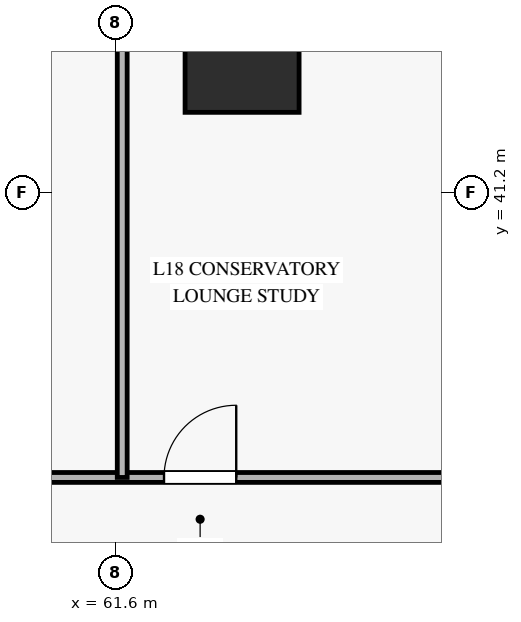
"""IFC4 building model, lengths in metres.
Left out: names, types, materials, properties, quantities, classifications, styles, units other than length and angle.
Written with IfcOpenShell. Run it as: python <this file> out.ifc"""

import sys

from ifc_helpers import new_model, si_unit, direction, frame, frame_2d, origin, origin_2d, place, context, subcontext, project, spatial, rectangle, hollow_rectangle, extrude, source, transform, mapped, element, fill, save


model = new_model("IFC4")
c1 = context("Model", 3, precision=1e-05, world=origin(), true_north=direction((0.0, 1.0)))
c2 = subcontext(c1, "Body", "Model", "MODEL_VIEW")
j1 = project(units=[si_unit("LENGTHUNIT", "METRE"), si_unit("PLANEANGLEUNIT", "RADIAN")], contexts=[c1])
p1 = place(None, origin())
s1 = spatial("IfcSite", under=j1, at=p1, CompositionType="ELEMENT")
p2 = place(p1, origin())
s2 = spatial("IfcBuilding", under=s1, at=p2, CompositionType="ELEMENT")
p3 = place(p2, frame((0.0, 0.0, 72.8)))
s3 = spatial("IfcBuildingStorey", under=s2, at=p3, CompositionType="ELEMENT", Elevation=72.8)
m1 = source(origin(), c2, "Body", "SweptSolid", [
    extrude(hollow_rectangle(XDim=1.5, YDim=1.5, WallThickness=0.07, at=origin_2d()), origin(), (0.0, 0.0, 1.0), 6.58),
])
p4 = place(p3, frame((63.265, 43.004, 0.0), z_axis=(0.0, 0.0, 1.0), x_axis=(1.0, 0.0, 0.0)))
e1 = element("IfcColumn", 1, at=p4, inside=s3, PredefinedType="COLUMN", context=c2, shape_type="MappedRepresentation", body=[
    mapped(m1, transform((0.0, 0.0, 0.0), x_axis=(1.0, 0.0, 0.0), y_axis=(0.0, 1.0, 0.0), z_axis=(0.0, 0.0, 1.0), scale=1.0)),
])
p5 = place(p3, frame((66.361, 43.004, 0.0), z_axis=(0.0, 0.0, 1.0), x_axis=(-0.624594762048, 0.780949027288, 0.0)))
e2 = element("IfcWall", 2, at=p5, inside=s3, PredefinedType="SOLIDWALL", context=c2, shape_type="SweptSolid", body=[
    extrude(rectangle(XDim=4.156, YDim=0.3, at=frame_2d((2.078, 0.0))), origin(), (0.0, 0.0, 1.0), 6.06),
])
p6 = place(p5, frame((1.278, 0.0, 0.45)))
e3 = element("IfcOpeningElement", 3, at=p6, cuts=e2, PredefinedType="OPENING", context=c2, shape_type="SweptSolid", body=[
    extrude(rectangle(XDim=1.6, YDim=2.0, at=frame_2d((0.8, 1.0))), frame((0.0, 0.16, 0.0), z_axis=(0.0, -1.0, 0.0), x_axis=(1.0, 0.0, 0.0)), (0.0, 0.0, 1.0), 0.32),
])
p7 = place(p3, frame((51.15, 37.45, 0.0), z_axis=(0.0, 0.0, 1.0), x_axis=(1.0, 0.0, 0.0)))
e4 = element("IfcWall", 4, at=p7, inside=s3, PredefinedType="PARTITIONING", context=c2, shape_type="SweptSolid", body=[
    extrude(rectangle(XDim=15.211, YDim=0.13, at=frame_2d((7.605, 0.0))), origin(), (0.0, 0.0, 1.0), 6.065),
])
p8 = place(p7, frame((0.5, 0.0, 0.0)))
e5 = element("IfcOpeningElement", 5, at=p8, cuts=e4, PredefinedType="OPENING", context=c2, shape_type="SweptSolid", body=[
    extrude(rectangle(XDim=0.9, YDim=2.1, at=frame_2d((0.45, 1.05))), frame((0.0, 0.075, 0.0), z_axis=(0.0, -1.0, 0.0), x_axis=(1.0, 0.0, 0.0)), (0.0, 0.0, 1.0), 0.15),
])
p9 = place(p7, frame((11.088, 0.0, 0.0)))
e6 = element("IfcOpeningElement", 6, at=p9, cuts=e4, PredefinedType="OPENING", context=c2, shape_type="SweptSolid", body=[
    extrude(rectangle(XDim=0.95, YDim=2.1, at=frame_2d((0.475, 1.05))), frame((0.0, 0.075, 0.0), z_axis=(0.0, -1.0, 0.0), x_axis=(1.0, 0.0, 0.0)), (0.0, 0.0, 1.0), 0.15),
])
p10 = place(p3, frame((61.688, 37.45, 0.0), z_axis=(0.0, 0.0, 1.0), x_axis=(0.0, 1.0, 0.0)))
e7 = element("IfcWall", 7, at=p10, inside=s3, PredefinedType="PARTITIONING", context=c2, shape_type="SweptSolid", body=[
    extrude(rectangle(XDim=8.8, YDim=0.13, at=frame_2d((4.4, 0.0))), origin(), (0.0, 0.0, 1.0), 6.58),
])
m2 = source(origin(), c2, "Body", "SweptSolid", [
    extrude(rectangle(XDim=0.95, YDim=2.1, at=frame_2d((0.475, 1.05))), frame((0.0, 0.025, 0.0), z_axis=(0.0, -1.0, 0.0), x_axis=(1.0, 0.0, 0.0)), (0.0, 0.0, 1.0), 0.05),
])
p11 = place(p9, origin())
e8 = element("IfcDoor", 8, at=p11, inside=s3, OperationType="SINGLE_SWING_RIGHT", PredefinedType="DOOR", context=c2, shape_type="MappedRepresentation", body=[
    mapped(m2, transform((0.0, 0.0, 0.0), x_axis=(1.0, 0.0, 0.0), y_axis=(0.0, 1.0, 0.0), z_axis=(0.0, 0.0, 1.0), scale=1.0)),
])
fill(e6, e8)
save(model, sys.argv[1])
